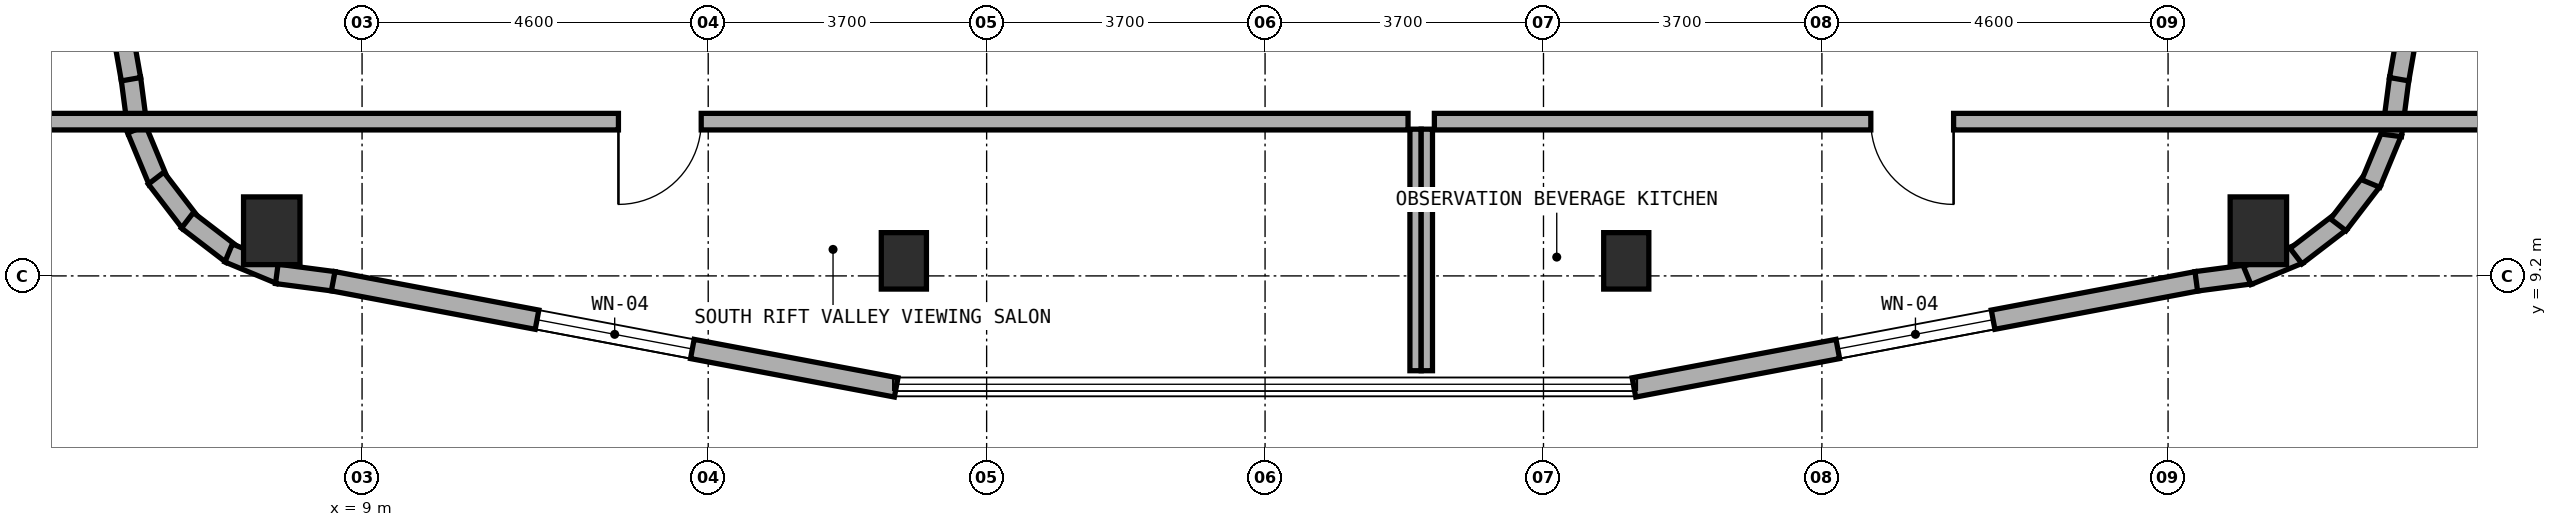
"""IFC4 building model, lengths in metres.
Left out: names, types, materials, properties, quantities, classifications, styles, units other than length and angle.
Written with IfcOpenShell. Run it as: python <this file> out.ifc"""

import sys

from ifc_helpers import new_model, si_unit, direction, frame, frame_2d, origin, origin_2d, place, context, subcontext, project, spatial, rectangle, extrude, element, fill, save


model = new_model("IFC4")
c1 = context("Model", 3, precision=1e-05, world=origin(), true_north=direction((0.0, 1.0)))
c2 = subcontext(c1, "Body", "Model", "MODEL_VIEW")
j1 = project(units=[si_unit("LENGTHUNIT", "METRE"), si_unit("PLANEANGLEUNIT", "RADIAN")], contexts=[c1])
p1 = place(None, origin())
s1 = spatial("IfcSite", under=j1, at=p1, CompositionType="ELEMENT")
p2 = place(p1, origin())
s2 = spatial("IfcBuilding", under=s1, at=p2, CompositionType="ELEMENT")
p3 = place(p2, frame((0.0, 0.0, 268.4)))
s3 = spatial("IfcBuildingStorey", under=s2, at=p3, CompositionType="ELEMENT", Elevation=268.4)
for number, where, z_axis, x_axis in (
    (1, (16.2, 9.4, 0.0), (0.0, 0.0, 1.0), (1.0, 0.0, 0.0)),
    (2, (25.8, 9.4, 0.0), (0.0, 0.0, 1.0), (1.0, 0.0, 0.0)),
):
    element("IfcColumn", number, at=place(p3, frame(where, z_axis=z_axis, x_axis=x_axis)), inside=s3, PredefinedType="COLUMN", context=c2, shape_type="SweptSolid", body=[
        extrude(rectangle(XDim=0.6, YDim=0.75, at=origin_2d()), origin(), (0.0, 0.0, 1.0), 3.6),
    ])
for number, where, z_axis, x_axis in (
    (3, (7.8, 9.8, 0.0), (0.0, 0.0, 1.0), (1.0, 0.0, 0.0)),
    (4, (34.2, 9.8, 0.0), (0.0, 0.0, 1.0), (1.0, 0.0, 0.0)),
):
    element("IfcColumn", number, at=place(p3, frame(where, z_axis=z_axis, x_axis=x_axis)), inside=s3, PredefinedType="COLUMN", context=c2, shape_type="SweptSolid", body=[
        extrude(rectangle(XDim=0.75, YDim=0.9, at=origin_2d()), origin(), (0.0, 0.0, 1.0), 3.6),
    ])
p4 = place(p3, frame((5.928, 11.825, 0.0), z_axis=(0.0, 0.0, 1.0), x_axis=(0.130255288807, -0.991480488834, 0.0)))
e5 = element("IfcWall", 5, at=p4, inside=s3, PredefinedType="STANDARD", context=c2, shape_type="SweptSolid", body=[
    extrude(rectangle(XDim=0.729, YDim=0.26, at=frame_2d((0.365, 0.0))), origin(), (0.0, 0.0, 1.0), 3.32),
])
for number, where, z_axis, x_axis in (
    (6, (6.005, 11.148, 0.0), (0.0, 0.0, 1.0), (0.384, -0.924, 0.0)),
    (7, (6.263, 10.499, 0.0), (0.0, 0.0, 1.0), (0.609, -0.793, 0.0)),
    (8, (6.679, 9.938, 0.0), (0.0, 0.0, 1.0), (0.793, -0.609, 0.0)),
):
    element("IfcWall", number, at=place(p3, frame(where, z_axis=z_axis, x_axis=x_axis)), inside=s3, PredefinedType="STANDARD", context=c2, shape_type="SweptSolid", body=[
        extrude(rectangle(XDim=0.746, YDim=0.26, at=frame_2d((0.373, 0.0))), origin(), (0.0, 0.0, 1.0), 3.32),
    ])
p5 = place(p3, frame((7.227, 9.505, 0.0), z_axis=(0.0, 0.0, 1.0), x_axis=(0.923637576129, -0.383267045233, 0.0)))
e9 = element("IfcWall", 9, at=p5, inside=s3, PredefinedType="STANDARD", context=c2, shape_type="SweptSolid", body=[
    extrude(rectangle(XDim=0.746, YDim=0.26, at=frame_2d((0.373, 0.0))), origin(), (0.0, 0.0, 1.0), 3.32),
])
p6 = place(p3, frame((7.867, 9.227, 0.0), z_axis=(0.0, 0.0, 1.0), x_axis=(0.991559404866, -0.129653178221, 0.0)))
e10 = element("IfcWall", 10, at=p6, inside=s3, PredefinedType="STANDARD", context=c2, shape_type="SweptSolid", body=[
    extrude(rectangle(XDim=0.764, YDim=0.26, at=frame_2d((0.382, 0.0))), origin(), (0.0, 0.0, 1.0), 3.32),
])
p7 = place(p3, frame((8.616, 9.129, 0.0), z_axis=(0.0, 0.0, 1.0), x_axis=(0.982680718126, -0.185306789468, 0.0)))
e11 = element("IfcWall", 11, at=p7, inside=s3, PredefinedType="STANDARD", context=c2, shape_type="SweptSolid", body=[
    extrude(rectangle(XDim=7.614, YDim=0.26, at=frame_2d((3.807, 0.0))), origin(), (0.0, 0.0, 1.0), 3.32),
])
p8 = place(p7, frame((2.757, 0.0, 0.85)))
e12 = element("IfcOpeningElement", 12, at=p8, cuts=e11, PredefinedType="OPENING", context=c2, shape_type="SweptSolid", body=[
    extrude(rectangle(XDim=2.1, YDim=1.5, at=frame_2d((1.05, 0.75))), frame((0.0, 0.14, 0.0), z_axis=(0.0, -1.0, 0.0), x_axis=(1.0, 0.0, 0.0)), (0.0, 0.0, 1.0), 0.28),
])
p9 = place(p3, frame((25.902, 7.718, 0.0), z_axis=(0.0, 0.0, 1.0), x_axis=(0.982680718126, 0.185306789468, 0.0)))
e13 = element("IfcWall", 13, at=p9, inside=s3, PredefinedType="STANDARD", context=c2, shape_type="SweptSolid", body=[
    extrude(rectangle(XDim=7.614, YDim=0.26, at=frame_2d((3.807, 0.0))), origin(), (0.0, 0.0, 1.0), 3.32),
])
p10 = place(p9, frame((2.757, 0.0, 0.85)))
e14 = element("IfcOpeningElement", 14, at=p10, cuts=e13, PredefinedType="OPENING", context=c2, shape_type="SweptSolid", body=[
    extrude(rectangle(XDim=2.1, YDim=1.5, at=frame_2d((1.05, 0.75))), frame((0.0, 0.14, 0.0), z_axis=(0.0, -1.0, 0.0), x_axis=(1.0, 0.0, 0.0)), (0.0, 0.0, 1.0), 0.28),
])
p11 = place(p3, frame((33.375, 9.128, 0.0), z_axis=(0.0, 0.0, 1.0), x_axis=(0.991480488834, 0.130255288807, 0.0)))
e15 = element("IfcWall", 15, at=p11, inside=s3, PredefinedType="STANDARD", context=c2, shape_type="SweptSolid", body=[
    extrude(rectangle(XDim=0.729, YDim=0.26, at=frame_2d((0.365, 0.0))), origin(), (0.0, 0.0, 1.0), 3.32),
])
p12 = place(p3, frame((34.052, 9.205, 0.0), z_axis=(0.0, 0.0, 1.0), x_axis=(0.923637576129, 0.383267045233, 0.0)))
e16 = element("IfcWall", 16, at=p12, inside=s3, PredefinedType="STANDARD", context=c2, shape_type="SweptSolid", body=[
    extrude(rectangle(XDim=0.746, YDim=0.26, at=frame_2d((0.373, 0.0))), origin(), (0.0, 0.0, 1.0), 3.32),
])
for number, where, z_axis, x_axis in (
    (17, (34.701, 9.463, 0.0), (0.0, 0.0, 1.0), (0.793, 0.609, 0.0)),
    (18, (35.262, 9.879, 0.0), (0.0, 0.0, 1.0), (0.609, 0.793, 0.0)),
):
    element("IfcWall", number, at=place(p3, frame(where, z_axis=z_axis, x_axis=x_axis)), inside=s3, PredefinedType="STANDARD", context=c2, shape_type="SweptSolid", body=[
        extrude(rectangle(XDim=0.746, YDim=0.26, at=frame_2d((0.373, 0.0))), origin(), (0.0, 0.0, 1.0), 3.32),
    ])
p13 = place(p3, frame((35.695, 10.427, 0.0), z_axis=(0.0, 0.0, 1.0), x_axis=(0.383267045233, 0.923637576129, 0.0)))
e19 = element("IfcWall", 19, at=p13, inside=s3, PredefinedType="STANDARD", context=c2, shape_type="SweptSolid", body=[
    extrude(rectangle(XDim=0.746, YDim=0.26, at=frame_2d((0.373, 0.0))), origin(), (0.0, 0.0, 1.0), 3.32),
])
p14 = place(p3, frame((35.973, 11.067, 0.0), z_axis=(0.0, 0.0, 1.0), x_axis=(0.129653178221, 0.991559404866, 0.0)))
e20 = element("IfcWall", 20, at=p14, inside=s3, PredefinedType="STANDARD", context=c2, shape_type="SweptSolid", body=[
    extrude(rectangle(XDim=0.764, YDim=0.26, at=frame_2d((0.382, 0.0))), origin(), (0.0, 0.0, 1.0), 3.32),
])
p15 = place(p3, frame((36.071, 11.814, 0.0), z_axis=(0.0, 0.0, 1.0), x_axis=(0.172801004781, 0.98495675679, 0.0)))
e21 = element("IfcWall", 21, at=p15, inside=s3, PredefinedType="STANDARD", context=c2, shape_type="SweptSolid", body=[
    extrude(rectangle(XDim=8.165, YDim=0.26, at=frame_2d((4.083, 0.0))), origin(), (0.0, 0.0, 1.0), 3.32),
])
p16 = place(p15, frame((3.921, 0.0, 0.85)))
e22 = element("IfcOpeningElement", 22, at=p16, cuts=e21, PredefinedType="OPENING", context=c2, shape_type="SweptSolid", body=[
    extrude(rectangle(XDim=2.1, YDim=1.5, at=frame_2d((1.05, 0.75))), frame((0.0, 0.14, 0.0), z_axis=(0.0, -1.0, 0.0), x_axis=(1.0, 0.0, 0.0)), (0.0, 0.0, 1.0), 0.28),
])
p17 = place(p3, frame((4.518, 19.856, 0.0), z_axis=(0.0, 0.0, 1.0), x_axis=(0.172801004781, -0.98495675679, 0.0)))
e23 = element("IfcWall", 23, at=p17, inside=s3, PredefinedType="STANDARD", context=c2, shape_type="SweptSolid", body=[
    extrude(rectangle(XDim=8.165, YDim=0.26, at=frame_2d((4.083, 0.0))), origin(), (0.0, 0.0, 1.0), 3.32),
])
p18 = place(p17, frame((0.317, 0.0, 0.85)))
e24 = element("IfcOpeningElement", 24, at=p18, cuts=e23, PredefinedType="OPENING", context=c2, shape_type="SweptSolid", body=[
    extrude(rectangle(XDim=1.5, YDim=1.5, at=frame_2d((0.75, 0.75))), frame((0.0, 0.14, 0.0), z_axis=(0.0, -1.0, 0.0), x_axis=(1.0, 0.0, 0.0)), (0.0, 0.0, 1.0), 0.28),
])
p19 = place(p17, frame((4.21, 0.0, 0.85)))
e25 = element("IfcOpeningElement", 25, at=p19, cuts=e23, PredefinedType="OPENING", context=c2, shape_type="SweptSolid", body=[
    extrude(rectangle(XDim=2.1, YDim=1.5, at=frame_2d((1.05, 0.75))), frame((0.0, 0.14, 0.0), z_axis=(0.0, -1.0, 0.0), x_axis=(1.0, 0.0, 0.0)), (0.0, 0.0, 1.0), 0.28),
])
p20 = place(p3, frame((23.0, 7.94, 0.0), z_axis=(0.0, 0.0, 1.0), x_axis=(0.0, 1.0, 0.0)))
e26 = element("IfcWall", 26, at=p20, inside=s3, PredefinedType="PARTITIONING", context=c2, shape_type="SweptSolid", body=[
    extrude(rectangle(XDim=3.21, YDim=0.15, at=frame_2d((1.605, 0.0))), origin(), (0.0, 0.0, 1.0), 3.015),
])
p21 = place(p3, frame((4.74, 11.25, 0.0), z_axis=(0.0, 0.0, 1.0), x_axis=(1.0, 0.0, 0.0)))
e27 = element("IfcWall", 27, at=p21, inside=s3, PredefinedType="SOLIDWALL", context=c2, shape_type="SweptSolid", body=[
    extrude(rectangle(XDim=18.16, YDim=0.22, at=frame_2d((9.08, 0.0))), origin(), (0.0, 0.0, 1.0), 2.795),
])
p22 = place(p21, frame((7.667, 0.0, 0.0)))
e28 = element("IfcOpeningElement", 28, at=p22, cuts=e27, PredefinedType="OPENING", context=c2, shape_type="SweptSolid", body=[
    extrude(rectangle(XDim=1.1, YDim=2.1, at=frame_2d((0.55, 1.05))), frame((0.0, 0.12, 0.0), z_axis=(0.0, -1.0, 0.0), x_axis=(1.0, 0.0, 0.0)), (0.0, 0.0, 1.0), 0.24),
])
p23 = place(p3, frame((23.15, 7.94, 0.0), z_axis=(0.0, 0.0, 1.0), x_axis=(0.0, 1.0, 0.0)))
e29 = element("IfcWall", 29, at=p23, inside=s3, PredefinedType="PARTITIONING", context=c2, shape_type="SweptSolid", body=[
    extrude(rectangle(XDim=3.21, YDim=0.15, at=frame_2d((1.605, 0.0))), origin(), (0.0, 0.0, 1.0), 3.015),
])
p24 = place(p3, frame((23.25, 11.25, 0.0), z_axis=(0.0, 0.0, 1.0), x_axis=(1.0, 0.0, 0.0)))
e30 = element("IfcWall", 30, at=p24, inside=s3, PredefinedType="SOLIDWALL", context=c2, shape_type="SweptSolid", body=[
    extrude(rectangle(XDim=14.01, YDim=0.22, at=frame_2d((7.005, 0.0))), origin(), (0.0, 0.0, 1.0), 2.795),
])
p25 = place(p24, frame((5.8, 0.0, 0.0)))
e31 = element("IfcOpeningElement", 31, at=p25, cuts=e30, PredefinedType="OPENING", context=c2, shape_type="SweptSolid", body=[
    extrude(rectangle(XDim=1.1, YDim=2.1, at=frame_2d((0.55, 1.05))), frame((0.0, 0.12, 0.0), z_axis=(0.0, -1.0, 0.0), x_axis=(1.0, 0.0, 0.0)), (0.0, 0.0, 1.0), 0.24),
])
p26 = place(p8, origin())
e32 = element("IfcWindow", 32, at=p26, inside=s3, PartitioningType="SINGLE_PANEL", PredefinedType="WINDOW", context=c2, shape_type="SweptSolid", body=[
    extrude(rectangle(XDim=2.1, YDim=1.5, at=frame_2d((1.05, 0.75))), frame((0.0, 0.03, 0.0), z_axis=(0.0, -1.0, 0.0), x_axis=(1.0, 0.0, 0.0)), (0.0, 0.0, 1.0), 0.06),
])
fill(e12, e32)
p27 = place(p10, origin())
e33 = element("IfcWindow", 33, at=p27, inside=s3, PartitioningType="SINGLE_PANEL", PredefinedType="WINDOW", context=c2, shape_type="SweptSolid", body=[
    extrude(rectangle(XDim=2.1, YDim=1.5, at=frame_2d((1.05, 0.75))), frame((0.0, 0.03, 0.0), z_axis=(0.0, -1.0, 0.0), x_axis=(1.0, 0.0, 0.0)), (0.0, 0.0, 1.0), 0.06),
])
fill(e14, e33)
p28 = place(p22, frame((1.1, 0.0, 0.0), z_axis=(0.0, 0.0, 1.0), x_axis=(-1.0, 0.0, 0.0)))
e34 = element("IfcDoor", 34, at=p28, inside=s3, OperationType="SINGLE_SWING_RIGHT", PredefinedType="DOOR", context=c2, shape_type="SweptSolid", body=[
    extrude(rectangle(XDim=1.1, YDim=2.1, at=frame_2d((0.55, 1.05))), frame((0.0, 0.025, 0.0), z_axis=(0.0, -1.0, 0.0), x_axis=(1.0, 0.0, 0.0)), (0.0, 0.0, 1.0), 0.05),
])
fill(e28, e34)
p29 = place(p25, frame((1.1, 0.0, 0.0), z_axis=(0.0, 0.0, 1.0), x_axis=(-1.0, 0.0, 0.0)))
e35 = element("IfcDoor", 35, at=p29, inside=s3, OperationType="SINGLE_SWING_LEFT", PredefinedType="DOOR", context=c2, shape_type="SweptSolid", body=[
    extrude(rectangle(XDim=1.1, YDim=2.1, at=frame_2d((0.55, 1.05))), frame((0.0, 0.025, 0.0), z_axis=(0.0, -1.0, 0.0), x_axis=(1.0, 0.0, 0.0)), (0.0, 0.0, 1.0), 0.05),
])
fill(e31, e35)
save(model, sys.argv[1])
